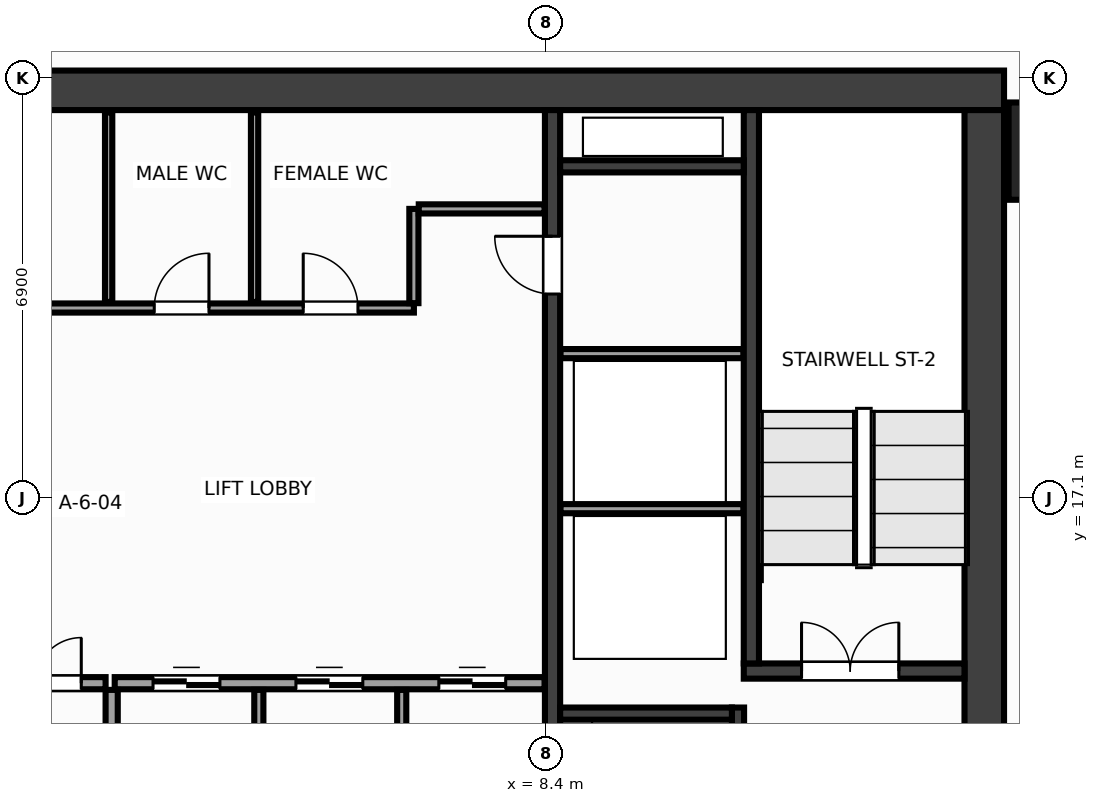
"""IFC4 building model, lengths in metres.
Left out: names, types, materials, properties, quantities, classifications, styles, units other than length and angle.
Written with IfcOpenShell. Run it as: python <this file> out.ifc"""

import sys

from ifc_helpers import new_model, si_unit, direction, frame, frame_2d, origin, origin_2d, place, context, subcontext, project, spatial, rectangle, extrude, source, transform, mapped, element, fill, save


model = new_model("IFC4")
c1 = context("Model", 3, precision=1e-05, world=origin(), true_north=direction((0.0, 1.0)))
c2 = subcontext(c1, "Body", "Model", "MODEL_VIEW")
j1 = project(units=[si_unit("LENGTHUNIT", "METRE"), si_unit("PLANEANGLEUNIT", "RADIAN")], contexts=[c1])
p1 = place(None, origin())
s1 = spatial("IfcSite", under=j1, at=p1, CompositionType="ELEMENT")
p2 = place(p1, origin())
s2 = spatial("IfcBuilding", under=s1, at=p2, CompositionType="ELEMENT")
p3 = place(p2, frame((0.0, 0.0, 88.4)))
s3 = spatial("IfcBuildingStorey", under=s2, at=p3, CompositionType="ELEMENT", Elevation=88.4)
m1 = source(origin(), c2, "Body", "SweptSolid", [
    extrude(rectangle(XDim=31.85, YDim=0.65, at=frame_2d((15.925, 0.0))), origin(), (0.0, 0.0, 1.0), 3.6),
])
p4 = place(p3, frame((-15.925, 23.8, 0.0), z_axis=(0.0, 0.0, 1.0), x_axis=(1.0, 0.0, 0.0)))
e1 = element("IfcWall", 1, at=p4, inside=s3, PredefinedType="SHEAR", context=c2, shape_type="MappedRepresentation", body=[
    mapped(m1, transform((0.0, 0.0, 0.0), x_axis=(1.0, 0.0, 0.0), y_axis=(0.0, 1.0, 0.0), z_axis=(0.0, 0.0, 1.0), scale=1.0)),
])
m2 = source(origin(), c2, "Body", "SweptSolid", [
    extrude(rectangle(XDim=12.95, YDim=0.65, at=frame_2d((6.475, 0.0))), origin(), (0.0, 0.0, 1.0), 3.6),
])
p5 = place(p3, frame((15.6, 10.525, 0.0), z_axis=(0.0, 0.0, 1.0), x_axis=(0.0, 1.0, 0.0)))
e2 = element("IfcWall", 2, at=p5, inside=s3, PredefinedType="SHEAR", context=c2, shape_type="MappedRepresentation", body=[
    mapped(m2, transform((0.0, 0.0, 0.0), x_axis=(1.0, 0.0, 0.0), y_axis=(0.0, 1.0, 0.0), z_axis=(0.0, 0.0, 1.0), scale=1.0)),
])
m3 = source(origin(), c2, "Body", "SweptSolid", [
    extrude(rectangle(XDim=12.95, YDim=0.25, at=frame_2d((6.475, 0.0))), origin(), (0.0, 0.0, 1.0), 3.6),
])
p6 = place(p3, frame((8.5, 10.525, 0.0), z_axis=(0.0, 0.0, 1.0), x_axis=(0.0, 1.0, 0.0)))
e3 = element("IfcWall", 3, at=p6, inside=s3, PredefinedType="SHEAR", context=c2, shape_type="MappedRepresentation", body=[
    mapped(m3, transform((0.0, 0.0, 0.0), x_axis=(1.0, 0.0, 0.0), y_axis=(0.0, 1.0, 0.0), z_axis=(0.0, 0.0, 1.0), scale=1.0)),
])
p7 = place(p6, frame((9.925, 0.0, 0.0)))
e4 = element("IfcOpeningElement", 4, at=p7, cuts=e3, PredefinedType="OPENING", context=c2, shape_type="SweptSolid", body=[
    extrude(rectangle(XDim=0.95, YDim=2.15, at=frame_2d((0.475, 1.075))), frame((0.0, 0.137, 0.0), z_axis=(0.0, -1.0, 0.0), x_axis=(1.0, 0.0, 0.0)), (0.0, 0.0, 1.0), 0.274),
])
m4 = source(origin(), c2, "Body", "SweptSolid", [
    extrude(rectangle(XDim=3.63, YDim=0.25, at=frame_2d((1.815, 0.0))), origin(), (0.0, 0.0, 1.0), 3.6),
])
p8 = place(p3, frame((11.645, 14.25, 0.0), z_axis=(0.0, 0.0, 1.0), x_axis=(1.0, 0.0, 0.0)))
e5 = element("IfcWall", 5, at=p8, inside=s3, PredefinedType="SHEAR", context=c2, shape_type="MappedRepresentation", body=[
    mapped(m4, transform((0.0, 0.0, 0.0), x_axis=(1.0, 0.0, 0.0), y_axis=(0.0, 1.0, 0.0), z_axis=(0.0, 0.0, 1.0), scale=1.0)),
])
p9 = place(p8, frame((0.95, 0.0, 0.0)))
e6 = element("IfcOpeningElement", 6, at=p9, cuts=e5, PredefinedType="OPENING", context=c2, shape_type="SweptSolid", body=[
    extrude(rectangle(XDim=1.6, YDim=2.15, at=frame_2d((0.8, 1.075))), frame((0.0, 0.137, 0.0), z_axis=(0.0, -1.0, 0.0), x_axis=(1.0, 0.0, 0.0)), (0.0, 0.0, 1.0), 0.274),
])
m5 = source(origin(), c2, "Body", "SweptSolid", [
    extrude(rectangle(XDim=9.1, YDim=0.25, at=frame_2d((4.55, 0.0))), origin(), (0.0, 0.0, 1.0), 3.6),
])
p10 = place(p3, frame((11.77, 14.375, 0.0), z_axis=(0.0, 0.0, 1.0), x_axis=(0.0, 1.0, 0.0)))
e7 = element("IfcWall", 7, at=p10, inside=s3, PredefinedType="SHEAR", context=c2, shape_type="MappedRepresentation", body=[
    mapped(m5, transform((0.0, 0.0, 0.0), x_axis=(1.0, 0.0, 0.0), y_axis=(0.0, 1.0, 0.0), z_axis=(0.0, 0.0, 1.0), scale=1.0)),
])
m6 = source(origin(), c2, "Body", "SweptSolid", [
    extrude(rectangle(XDim=3.125, YDim=0.2, at=frame_2d((1.562, 0.0))), origin(), (0.0, 0.0, 1.0), 3.6),
])
p11 = place(p3, frame((11.55, 10.525, 0.0), z_axis=(0.0, 0.0, 1.0), x_axis=(0.0, 1.0, 0.0)))
e8 = element("IfcWall", 8, at=p11, inside=s3, PredefinedType="SHEAR", context=c2, shape_type="MappedRepresentation", body=[
    mapped(m6, transform((0.0, 0.0, 0.0), x_axis=(1.0, 0.0, 0.0), y_axis=(0.0, 1.0, 0.0), z_axis=(0.0, 0.0, 1.0), scale=1.0)),
])
p12 = place(p11, frame((0.9, 0.0, 0.0)))
e9 = element("IfcOpeningElement", 9, at=p12, cuts=e8, PredefinedType="OPENING", context=c2, shape_type="SweptSolid", body=[
    extrude(rectangle(XDim=1.1, YDim=2.15, at=frame_2d((0.55, 1.075))), frame((0.0, 0.112, 0.0), z_axis=(0.0, -1.0, 0.0), x_axis=(1.0, 0.0, 0.0)), (0.0, 0.0, 1.0), 0.224),
])
m7 = source(origin(), c2, "Body", "SweptSolid", [
    extrude(rectangle(XDim=2.825, YDim=0.2, at=frame_2d((1.413, 0.0))), origin(), (0.0, 0.0, 1.0), 3.6),
])
p13 = place(p3, frame((8.625, 13.55, 0.0), z_axis=(0.0, 0.0, 1.0), x_axis=(1.0, 0.0, 0.0)))
e10 = element("IfcWall", 10, at=p13, inside=s3, PredefinedType="SHEAR", context=c2, shape_type="MappedRepresentation", body=[
    mapped(m7, transform((0.0, 0.0, 0.0), x_axis=(1.0, 0.0, 0.0), y_axis=(0.0, 1.0, 0.0), z_axis=(0.0, 0.0, 1.0), scale=1.0)),
])
m8 = source(origin(), c2, "Body", "SweptSolid", [
    extrude(rectangle(XDim=3.02, YDim=0.2, at=frame_2d((1.51, 0.0))), origin(), (0.0, 0.0, 1.0), 3.6),
])
p14 = place(p3, frame((8.625, 22.55, 0.0), z_axis=(0.0, 0.0, 1.0), x_axis=(1.0, 0.0, 0.0)))
e11 = element("IfcWall", 11, at=p14, inside=s3, PredefinedType="SHEAR", context=c2, shape_type="MappedRepresentation", body=[
    mapped(m8, transform((0.0, 0.0, 0.0), x_axis=(1.0, 0.0, 0.0), y_axis=(0.0, 1.0, 0.0), z_axis=(0.0, 0.0, 1.0), scale=1.0)),
])
m9 = source(origin(), c2, "Body", "SweptSolid", [
    extrude(rectangle(XDim=1.6, YDim=1.6, at=origin_2d()), origin(), (0.0, 0.0, 1.0), 3.6),
])
p15 = place(p3, frame((16.8, 22.8, 0.0), z_axis=(0.0, 0.0, 1.0), x_axis=(1.0, 0.0, 0.0)))
e12 = element("IfcColumn", 12, at=p15, inside=s3, PredefinedType="COLUMN", context=c2, shape_type="MappedRepresentation", body=[
    mapped(m9, transform((0.0, 0.0, 0.0), x_axis=(1.0, 0.0, 0.0), y_axis=(0.0, 1.0, 0.0), z_axis=(0.0, 0.0, 1.0), scale=1.0)),
])
m10 = source(origin(), c2, "Body", "SweptSolid", [
    extrude(rectangle(XDim=3.01, YDim=0.15, at=frame_2d((1.505, 0.0))), origin(), (0.0, 0.0, 1.0), 3.36),
])
for number, where, z_axis, x_axis in (
    (13, (8.63, 16.92, 0.0), (0.0, 0.0, 1.0), (1.0, 0.0, 0.0)),
    (14, (8.63, 19.47, 0.0), (0.0, 0.0, 1.0), (1.0, 0.0, 0.0)),
):
    element("IfcWall", number, at=place(p3, frame(where, z_axis=z_axis, x_axis=x_axis)), inside=s3, PredefinedType="PARTITIONING", context=c2, shape_type="MappedRepresentation", body=[
        mapped(m10, transform((0.0, 0.0, 0.0), x_axis=(1.0, 0.0, 0.0), y_axis=(0.0, 1.0, 0.0), z_axis=(0.0, 0.0, 1.0), scale=1.0)),
    ])
m11 = source(origin(), c2, "Body", "SweptSolid", [
    extrude(rectangle(XDim=7.07, YDim=0.2, at=frame_2d((3.535, 0.0))), origin(), (0.0, 0.0, 1.0), 3.36),
])
p16 = place(p3, frame((1.3, 14.05, 0.0), z_axis=(0.0, 0.0, 1.0), x_axis=(1.0, 0.0, 0.0)))
e15 = element("IfcWall", 15, at=p16, inside=s3, PredefinedType="PARTITIONING", context=c2, shape_type="MappedRepresentation", body=[
    mapped(m11, transform((0.0, 0.0, 0.0), x_axis=(1.0, 0.0, 0.0), y_axis=(0.0, 1.0, 0.0), z_axis=(0.0, 0.0, 1.0), scale=1.0)),
])
p17 = place(p16, frame((0.63, 0.0, 0.0)))
e16 = element("IfcOpeningElement", 16, at=p17, cuts=e15, PredefinedType="OPENING", context=c2, shape_type="SweptSolid", body=[
    extrude(rectangle(XDim=1.1, YDim=2.15, at=frame_2d((0.55, 1.075))), frame((0.0, 0.112, 0.0), z_axis=(0.0, -1.0, 0.0), x_axis=(1.0, 0.0, 0.0)), (0.0, 0.0, 1.0), 0.224),
])
p18 = place(p16, frame((2.98, 0.0, 0.0)))
e17 = element("IfcOpeningElement", 17, at=p18, cuts=e15, PredefinedType="OPENING", context=c2, shape_type="SweptSolid", body=[
    extrude(rectangle(XDim=1.1, YDim=2.15, at=frame_2d((0.55, 1.075))), frame((0.0, 0.112, 0.0), z_axis=(0.0, -1.0, 0.0), x_axis=(1.0, 0.0, 0.0)), (0.0, 0.0, 1.0), 0.224),
])
p19 = place(p16, frame((5.33, 0.0, 0.0)))
e18 = element("IfcOpeningElement", 18, at=p19, cuts=e15, PredefinedType="OPENING", context=c2, shape_type="SweptSolid", body=[
    extrude(rectangle(XDim=1.1, YDim=2.15, at=frame_2d((0.55, 1.075))), frame((0.0, 0.112, 0.0), z_axis=(0.0, -1.0, 0.0), x_axis=(1.0, 0.0, 0.0)), (0.0, 0.0, 1.0), 0.224),
])
m12 = source(origin(), c2, "Body", "SweptSolid", [
    extrude(rectangle(XDim=3.415, YDim=0.2, at=frame_2d((1.708, 0.0))), origin(), (0.0, 0.0, 1.0), 3.36),
])
p20 = place(p3, frame((1.25, 10.525, 0.0), z_axis=(0.0, 0.0, 1.0), x_axis=(0.0, 1.0, 0.0)))
e19 = element("IfcWall", 19, at=p20, inside=s3, PredefinedType="PARTITIONING", context=c2, shape_type="MappedRepresentation", body=[
    mapped(m12, transform((0.0, 0.0, 0.0), x_axis=(1.0, 0.0, 0.0), y_axis=(0.0, 1.0, 0.0), z_axis=(0.0, 0.0, 1.0), scale=1.0)),
])
m13 = source(origin(), c2, "Body", "SweptSolid", [
    extrude(rectangle(XDim=2.3, YDim=0.2, at=frame_2d((1.15, 0.0))), origin(), (0.0, 0.0, 1.0), 3.36),
])
p21 = place(p3, frame((-1.15, 14.05, 0.0), z_axis=(0.0, 0.0, 1.0), x_axis=(1.0, 0.0, 0.0)))
e20 = element("IfcWall", 20, at=p21, inside=s3, PredefinedType="PARTITIONING", context=c2, shape_type="MappedRepresentation", body=[
    mapped(m13, transform((0.0, 0.0, 0.0), x_axis=(1.0, 0.0, 0.0), y_axis=(0.0, 1.0, 0.0), z_axis=(0.0, 0.0, 1.0), scale=1.0)),
])
p22 = place(p21, frame((0.4, 0.0, 0.0)))
e21 = element("IfcOpeningElement", 21, at=p22, cuts=e20, PredefinedType="OPENING", context=c2, shape_type="SweptSolid", body=[
    extrude(rectangle(XDim=1.5, YDim=2.2, at=frame_2d((0.75, 1.1))), frame((0.0, 0.112, 0.0), z_axis=(0.0, -1.0, 0.0), x_axis=(1.0, 0.0, 0.0)), (0.0, 0.0, 1.0), 0.224),
])
m14 = source(origin(), c2, "Body", "SweptSolid", [
    extrude(rectangle(XDim=14.59, YDim=0.15, at=frame_2d((7.295, 0.0))), origin(), (0.0, 0.0, 1.0), 3.36),
])
p23 = place(p3, frame((-8.37, 20.22, 0.0), z_axis=(0.0, 0.0, 1.0), x_axis=(1.0, 0.0, 0.0)))
e22 = element("IfcWall", 22, at=p23, inside=s3, PredefinedType="PARTITIONING", context=c2, shape_type="MappedRepresentation", body=[
    mapped(m14, transform((0.0, 0.0, 0.0), x_axis=(1.0, 0.0, 0.0), y_axis=(0.0, 1.0, 0.0), z_axis=(0.0, 0.0, 1.0), scale=1.0)),
])
p24 = place(p23, frame((4.36, 0.0, 0.0)))
e23 = element("IfcOpeningElement", 23, at=p24, cuts=e22, PredefinedType="OPENING", context=c2, shape_type="SweptSolid", body=[
    extrude(rectangle(XDim=0.9, YDim=2.15, at=frame_2d((0.45, 1.075))), frame((0.0, 0.087, 0.0), z_axis=(0.0, -1.0, 0.0), x_axis=(1.0, 0.0, 0.0)), (0.0, 0.0, 1.0), 0.174),
])
p25 = place(p23, frame((10.32, 0.0, 0.0)))
e24 = element("IfcOpeningElement", 24, at=p25, cuts=e22, PredefinedType="OPENING", context=c2, shape_type="SweptSolid", body=[
    extrude(rectangle(XDim=0.9, YDim=2.15, at=frame_2d((0.45, 1.075))), frame((0.0, 0.087, 0.0), z_axis=(0.0, -1.0, 0.0), x_axis=(1.0, 0.0, 0.0)), (0.0, 0.0, 1.0), 0.174),
])
p26 = place(p23, frame((12.77, 0.0, 0.0)))
e25 = element("IfcOpeningElement", 25, at=p26, cuts=e22, PredefinedType="OPENING", context=c2, shape_type="SweptSolid", body=[
    extrude(rectangle(XDim=0.9, YDim=2.15, at=frame_2d((0.45, 1.075))), frame((0.0, 0.087, 0.0), z_axis=(0.0, -1.0, 0.0), x_axis=(1.0, 0.0, 0.0)), (0.0, 0.0, 1.0), 0.174),
])
m15 = source(origin(), c2, "Body", "SweptSolid", [
    extrude(rectangle(XDim=1.55, YDim=0.15, at=frame_2d((0.775, 0.0))), origin(), (0.0, 0.0, 1.0), 3.36),
])
p27 = place(p3, frame((6.22, 20.3, 0.0), z_axis=(0.0, 0.0, 1.0), x_axis=(0.0, 1.0, 0.0)))
e26 = element("IfcWall", 26, at=p27, inside=s3, PredefinedType="PARTITIONING", context=c2, shape_type="MappedRepresentation", body=[
    mapped(m15, transform((0.0, 0.0, 0.0), x_axis=(1.0, 0.0, 0.0), y_axis=(0.0, 1.0, 0.0), z_axis=(0.0, 0.0, 1.0), scale=1.0)),
])
m16 = source(origin(), c2, "Body", "SweptSolid", [
    extrude(rectangle(XDim=2.07, YDim=0.15, at=frame_2d((1.035, 0.0))), origin(), (0.0, 0.0, 1.0), 3.36),
])
p28 = place(p3, frame((6.3, 21.85, 0.0), z_axis=(0.0, 0.0, 1.0), x_axis=(1.0, 0.0, 0.0)))
e27 = element("IfcWall", 27, at=p28, inside=s3, PredefinedType="PARTITIONING", context=c2, shape_type="MappedRepresentation", body=[
    mapped(m16, transform((0.0, 0.0, 0.0), x_axis=(1.0, 0.0, 0.0), y_axis=(0.0, 1.0, 0.0), z_axis=(0.0, 0.0, 1.0), scale=1.0)),
])
m17 = source(origin(), c2, "Body", "SweptSolid", [
    extrude(rectangle(XDim=3.415, YDim=0.15, at=frame_2d((1.708, 0.0))), origin(), (0.0, 0.0, 1.0), 3.36),
])
for number, where, z_axis, x_axis in (
    (28, (3.67, 10.525, 0.0), (0.0, 0.0, 1.0), (0.0, 1.0, 0.0)),
    (29, (6.02, 10.525, 0.0), (0.0, 0.0, 1.0), (0.0, 1.0, 0.0)),
):
    element("IfcWall", number, at=place(p3, frame(where, z_axis=z_axis, x_axis=x_axis)), inside=s3, PredefinedType="PARTITIONING", context=c2, shape_type="MappedRepresentation", body=[
        mapped(m17, transform((0.0, 0.0, 0.0), x_axis=(1.0, 0.0, 0.0), y_axis=(0.0, 1.0, 0.0), z_axis=(0.0, 0.0, 1.0), scale=1.0)),
    ])
m18 = source(origin(), c2, "Body", "SweptSolid", [
    extrude(rectangle(XDim=3.115, YDim=0.12, at=frame_2d((1.558, 0.0))), origin(), (0.0, 0.0, 1.0), 3.36),
])
for number, where, z_axis, x_axis in (
    (30, (1.2, 20.32, 0.0), (0.0, 0.0, 1.0), (0.0, 1.0, 0.0)),
    (31, (3.6, 20.32, 0.0), (0.0, 0.0, 1.0), (0.0, 1.0, 0.0)),
):
    element("IfcWall", number, at=place(p3, frame(where, z_axis=z_axis, x_axis=x_axis)), inside=s3, PredefinedType="PARTITIONING", context=c2, shape_type="MappedRepresentation", body=[
        mapped(m18, transform((0.0, 0.0, 0.0), x_axis=(1.0, 0.0, 0.0), y_axis=(0.0, 1.0, 0.0), z_axis=(0.0, 0.0, 1.0), scale=1.0)),
    ])
m19 = source(origin(), c2, "Body", "SweptSolid", [
    extrude(rectangle(XDim=1.6, YDim=2.15, at=frame_2d((0.8, 1.075))), frame((0.0, 0.025, 0.0), z_axis=(0.0, -1.0, 0.0), x_axis=(1.0, 0.0, 0.0)), (0.0, 0.0, 1.0), 0.05),
])
p29 = place(p9, origin())
e32 = element("IfcDoor", 32, at=p29, inside=s3, OperationType="DOUBLE_DOOR_SINGLE_SWING", PredefinedType="DOOR", context=c2, shape_type="MappedRepresentation", body=[
    mapped(m19, transform((0.0, 0.0, 0.0), x_axis=(1.0, 0.0, 0.0), y_axis=(0.0, 1.0, 0.0), z_axis=(0.0, 0.0, 1.0), scale=1.0)),
])
fill(e6, e32)
m20 = source(origin(), c2, "Body", "SweptSolid", [
    extrude(rectangle(XDim=0.95, YDim=2.15, at=frame_2d((0.475, 1.075))), frame((0.0, 0.025, 0.0), z_axis=(0.0, -1.0, 0.0), x_axis=(1.0, 0.0, 0.0)), (0.0, 0.0, 1.0), 0.05),
])
p30 = place(p7, origin())
e33 = element("IfcDoor", 33, at=p30, inside=s3, OperationType="SINGLE_SWING_RIGHT", PredefinedType="DOOR", context=c2, shape_type="MappedRepresentation", body=[
    mapped(m20, transform((0.0, 0.0, 0.0), x_axis=(1.0, 0.0, 0.0), y_axis=(0.0, 1.0, 0.0), z_axis=(0.0, 0.0, 1.0), scale=1.0)),
])
fill(e4, e33)
m21 = source(origin(), c2, "Body", "SweptSolid", [
    extrude(rectangle(XDim=1.1, YDim=2.15, at=frame_2d((0.55, 1.075))), frame((0.0, 0.025, 0.0), z_axis=(0.0, -1.0, 0.0), x_axis=(1.0, 0.0, 0.0)), (0.0, 0.0, 1.0), 0.05),
])
p31 = place(p17, origin())
e34 = element("IfcDoor", 34, at=p31, inside=s3, OperationType="DOUBLE_DOOR_SLIDING", PredefinedType="DOOR", context=c2, shape_type="MappedRepresentation", body=[
    mapped(m21, transform((0.0, 0.0, 0.0), x_axis=(1.0, 0.0, 0.0), y_axis=(0.0, 1.0, 0.0), z_axis=(0.0, 0.0, 1.0), scale=1.0)),
])
fill(e16, e34)
p32 = place(p18, origin())
e35 = element("IfcDoor", 35, at=p32, inside=s3, OperationType="DOUBLE_DOOR_SLIDING", PredefinedType="DOOR", context=c2, shape_type="MappedRepresentation", body=[
    mapped(m21, transform((0.0, 0.0, 0.0), x_axis=(1.0, 0.0, 0.0), y_axis=(0.0, 1.0, 0.0), z_axis=(0.0, 0.0, 1.0), scale=1.0)),
])
fill(e17, e35)
p33 = place(p19, origin())
e36 = element("IfcDoor", 36, at=p33, inside=s3, OperationType="DOUBLE_DOOR_SLIDING", PredefinedType="DOOR", context=c2, shape_type="MappedRepresentation", body=[
    mapped(m21, transform((0.0, 0.0, 0.0), x_axis=(1.0, 0.0, 0.0), y_axis=(0.0, 1.0, 0.0), z_axis=(0.0, 0.0, 1.0), scale=1.0)),
])
fill(e18, e36)
m22 = source(origin(), c2, "Body", "SweptSolid", [
    extrude(rectangle(XDim=1.5, YDim=2.2, at=frame_2d((0.75, 1.1))), frame((0.0, 0.025, 0.0), z_axis=(0.0, -1.0, 0.0), x_axis=(1.0, 0.0, 0.0)), (0.0, 0.0, 1.0), 0.05),
])
p34 = place(p22, origin())
e37 = element("IfcDoor", 37, at=p34, inside=s3, OperationType="DOUBLE_DOOR_SINGLE_SWING", PredefinedType="DOOR", context=c2, shape_type="MappedRepresentation", body=[
    mapped(m22, transform((0.0, 0.0, 0.0), x_axis=(1.0, 0.0, 0.0), y_axis=(0.0, 1.0, 0.0), z_axis=(0.0, 0.0, 1.0), scale=1.0)),
])
fill(e21, e37)
m23 = source(origin(), c2, "Body", "SweptSolid", [
    extrude(rectangle(XDim=0.9, YDim=2.15, at=frame_2d((0.45, 1.075))), frame((0.0, 0.025, 0.0), z_axis=(0.0, -1.0, 0.0), x_axis=(1.0, 0.0, 0.0)), (0.0, 0.0, 1.0), 0.05),
])
p35 = place(p25, origin())
e38 = element("IfcDoor", 38, at=p35, inside=s3, OperationType="SINGLE_SWING_RIGHT", PredefinedType="DOOR", context=c2, shape_type="MappedRepresentation", body=[
    mapped(m23, transform((0.0, 0.0, 0.0), x_axis=(1.0, 0.0, 0.0), y_axis=(0.0, 1.0, 0.0), z_axis=(0.0, 0.0, 1.0), scale=1.0)),
])
fill(e24, e38)
p36 = place(p26, origin())
e39 = element("IfcDoor", 39, at=p36, inside=s3, OperationType="SINGLE_SWING_LEFT", PredefinedType="DOOR", context=c2, shape_type="MappedRepresentation", body=[
    mapped(m23, transform((0.0, 0.0, 0.0), x_axis=(1.0, 0.0, 0.0), y_axis=(0.0, 1.0, 0.0), z_axis=(0.0, 0.0, 1.0), scale=1.0)),
])
fill(e25, e39)
save(model, sys.argv[1])
